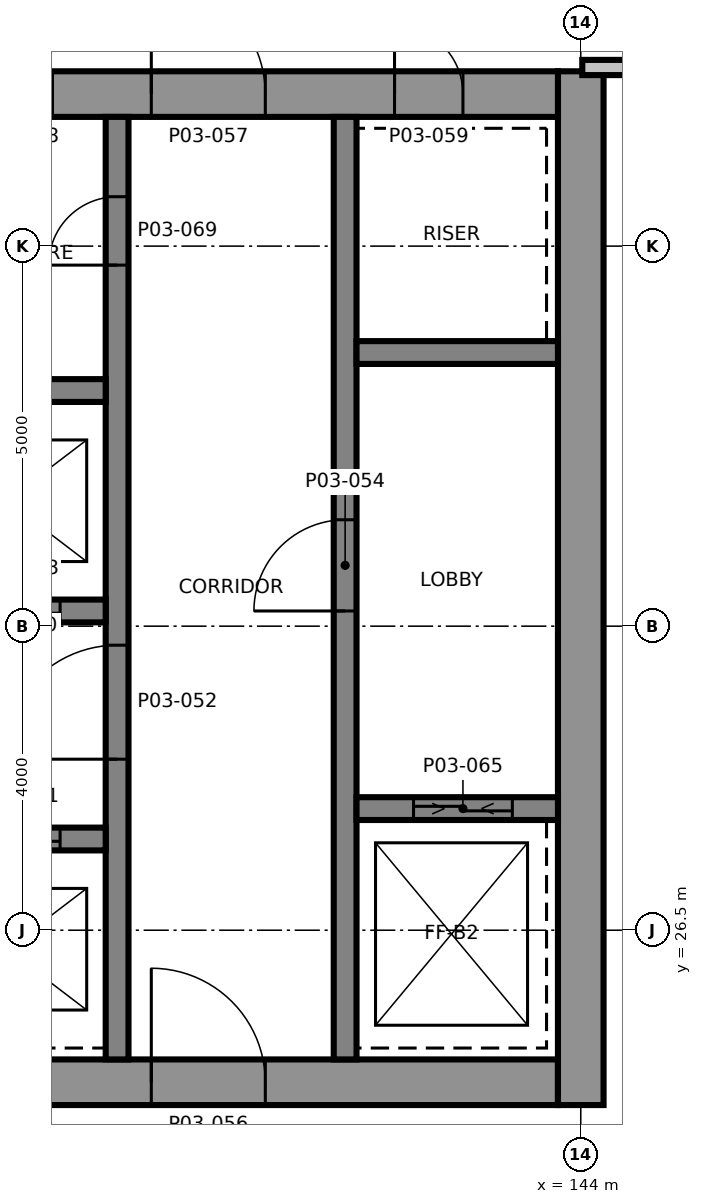
"""IFC4 building model, lengths in metres.
Left out: names, types, materials, properties, quantities, classifications, styles, units other than length and angle.
Written with IfcOpenShell. Run it as: python <this file> out.ifc"""

import sys

from ifc_helpers import new_model, si_unit, direction, frame, frame_2d, origin, place, context, subcontext, project, spatial, rectangle, extrude, element, fill, save


model = new_model("IFC4")
c1 = context("Model", 3, precision=1e-05, world=origin(), true_north=direction((0.0, 1.0)))
c2 = subcontext(c1, "Body", "Model", "MODEL_VIEW")
j1 = project(units=[si_unit("LENGTHUNIT", "METRE"), si_unit("PLANEANGLEUNIT", "RADIAN")], contexts=[c1])
p1 = place(None, origin())
s1 = spatial("IfcSite", under=j1, at=p1, CompositionType="ELEMENT")
p2 = place(p1, origin())
s2 = spatial("IfcBuilding", under=s1, at=p2, CompositionType="ELEMENT")
p3 = place(p2, frame((0.0, 0.0, 18.5)))
s3 = spatial("IfcBuildingStorey", under=s2, at=p3, CompositionType="ELEMENT", Elevation=18.5)
p4 = place(p3, frame((128.7, 24.5, 0.0), z_axis=(0.0, 0.0, 1.0), x_axis=(1.0, 0.0, 0.0)))
e1 = element("IfcWall", 1, at=p4, inside=s3, PredefinedType="SHEAR", context=c2, shape_type="SweptSolid", body=[
    extrude(rectangle(XDim=15.0, YDim=0.6, at=frame_2d((7.5, 0.0))), origin(), (0.0, 0.0, 1.0), 5.0),
])
p5 = place(p4, frame((9.65, 0.0, 0.0)))
e2 = element("IfcOpeningElement", 2, at=p5, cuts=e1, PredefinedType="OPENING", context=c2, shape_type="SweptSolid", body=[
    extrude(rectangle(XDim=1.5, YDim=2.1, at=frame_2d((0.75, 1.05))), frame((0.0, 0.31, 0.0), z_axis=(0.0, -1.0, 0.0), x_axis=(1.0, 0.0, 0.0)), (0.0, 0.0, 1.0), 0.62),
])
p6 = place(p4, frame((1.25, 0.0, 0.0)))
e3 = element("IfcOpeningElement", 3, at=p6, cuts=e1, PredefinedType="OPENING", context=c2, shape_type="SweptSolid", body=[
    extrude(rectangle(XDim=0.9, YDim=2.1, at=frame_2d((0.45, 1.05))), frame((0.0, 0.31, 0.0), z_axis=(0.0, -1.0, 0.0), x_axis=(1.0, 0.0, 0.0)), (0.0, 0.0, 1.0), 0.62),
])
p7 = place(p3, frame((144.0, 24.2, 0.0), z_axis=(0.0, 0.0, 1.0), x_axis=(0.0, 1.0, 0.0)))
e4 = element("IfcWall", 4, at=p7, inside=s3, PredefinedType="SHEAR", context=c2, shape_type="SweptSolid", body=[
    extrude(rectangle(XDim=13.6, YDim=0.6, at=frame_2d((6.8, 0.0))), origin(), (0.0, 0.0, 1.0), 5.0),
])
p8 = place(p3, frame((128.7, 37.5, 0.0), z_axis=(0.0, 0.0, 1.0), x_axis=(1.0, 0.0, 0.0)))
e5 = element("IfcWall", 5, at=p8, inside=s3, PredefinedType="SHEAR", context=c2, shape_type="SweptSolid", body=[
    extrude(rectangle(XDim=15.0, YDim=0.6, at=frame_2d((7.5, 0.0))), origin(), (0.0, 0.0, 1.0), 5.0),
])
p9 = place(p8, frame((9.65, 0.0, 0.0)))
e6 = element("IfcOpeningElement", 6, at=p9, cuts=e5, PredefinedType="OPENING", context=c2, shape_type="SweptSolid", body=[
    extrude(rectangle(XDim=1.5, YDim=2.1, at=frame_2d((0.75, 1.05))), frame((0.0, 0.31, 0.0), z_axis=(0.0, -1.0, 0.0), x_axis=(1.0, 0.0, 0.0)), (0.0, 0.0, 1.0), 0.62),
])
p10 = place(p8, frame((12.85, 0.0, 0.0)))
e7 = element("IfcOpeningElement", 7, at=p10, cuts=e5, PredefinedType="OPENING", context=c2, shape_type="SweptSolid", body=[
    extrude(rectangle(XDim=0.9, YDim=2.1, at=frame_2d((0.45, 1.05))), frame((0.0, 0.31, 0.0), z_axis=(0.0, -1.0, 0.0), x_axis=(1.0, 0.0, 0.0)), (0.0, 0.0, 1.0), 0.62),
])
p11 = place(p8, frame((3.6, 0.0, 0.0)))
e8 = element("IfcOpeningElement", 8, at=p11, cuts=e5, PredefinedType="OPENING", context=c2, shape_type="SweptSolid", body=[
    extrude(rectangle(XDim=0.9, YDim=2.1, at=frame_2d((0.45, 1.05))), frame((0.0, 0.31, 0.0), z_axis=(0.0, -1.0, 0.0), x_axis=(1.0, 0.0, 0.0)), (0.0, 0.0, 1.0), 0.62),
])
p12 = place(p8, frame((5.5, 0.0, 0.0)))
e9 = element("IfcOpeningElement", 9, at=p12, cuts=e5, PredefinedType="OPENING", context=c2, shape_type="SweptSolid", body=[
    extrude(rectangle(XDim=0.9, YDim=2.1, at=frame_2d((0.45, 1.05))), frame((0.0, 0.31, 0.0), z_axis=(0.0, -1.0, 0.0), x_axis=(1.0, 0.0, 0.0)), (0.0, 0.0, 1.0), 0.62),
])
p13 = place(p8, frame((7.45, 0.0, 0.0)))
e10 = element("IfcOpeningElement", 10, at=p13, cuts=e5, PredefinedType="OPENING", context=c2, shape_type="SweptSolid", body=[
    extrude(rectangle(XDim=0.9, YDim=2.1, at=frame_2d((0.45, 1.05))), frame((0.0, 0.31, 0.0), z_axis=(0.0, -1.0, 0.0), x_axis=(1.0, 0.0, 0.0)), (0.0, 0.0, 1.0), 0.62),
])
p14 = place(p3, frame((137.9, 24.8, 0.0), z_axis=(0.0, 0.0, 1.0), x_axis=(0.0, 1.0, 0.0)))
e11 = element("IfcWall", 11, at=p14, inside=s3, PredefinedType="SHEAR", context=c2, shape_type="SweptSolid", body=[
    extrude(rectangle(XDim=12.4, YDim=0.3, at=frame_2d((6.2, 0.0))), origin(), (0.0, 0.0, 1.0), 5.0),
])
p15 = place(p14, frame((3.95, 0.0, 0.0)))
e12 = element("IfcOpeningElement", 12, at=p15, cuts=e11, PredefinedType="OPENING", context=c2, shape_type="SweptSolid", body=[
    extrude(rectangle(XDim=1.5, YDim=2.1, at=frame_2d((0.75, 1.05))), frame((0.0, 0.16, 0.0), z_axis=(0.0, -1.0, 0.0), x_axis=(1.0, 0.0, 0.0)), (0.0, 0.0, 1.0), 0.32),
])
p16 = place(p14, frame((10.45, 0.0, 0.0)))
e13 = element("IfcOpeningElement", 13, at=p16, cuts=e11, PredefinedType="OPENING", context=c2, shape_type="SweptSolid", body=[
    extrude(rectangle(XDim=0.9, YDim=2.1, at=frame_2d((0.45, 1.05))), frame((0.0, 0.16, 0.0), z_axis=(0.0, -1.0, 0.0), x_axis=(1.0, 0.0, 0.0)), (0.0, 0.0, 1.0), 0.32),
])
p17 = place(p3, frame((140.9, 24.8, 0.0), z_axis=(0.0, 0.0, 1.0), x_axis=(0.0, 1.0, 0.0)))
e14 = element("IfcWall", 14, at=p17, inside=s3, PredefinedType="SHEAR", context=c2, shape_type="SweptSolid", body=[
    extrude(rectangle(XDim=12.4, YDim=0.3, at=frame_2d((6.2, 0.0))), origin(), (0.0, 0.0, 1.0), 5.0),
])
p18 = place(p17, frame((5.9, 0.0, 0.0)))
e15 = element("IfcOpeningElement", 15, at=p18, cuts=e14, PredefinedType="OPENING", context=c2, shape_type="SweptSolid", body=[
    extrude(rectangle(XDim=1.2, YDim=2.1, at=frame_2d((0.6, 1.05))), frame((0.0, 0.16, 0.0), z_axis=(0.0, -1.0, 0.0), x_axis=(1.0, 0.0, 0.0)), (0.0, 0.0, 1.0), 0.32),
])
p19 = place(p3, frame((132.25, 27.7, 0.0), z_axis=(0.0, 0.0, 1.0), x_axis=(1.0, 0.0, 0.0)))
e16 = element("IfcWall", 16, at=p19, inside=s3, PredefinedType="SHEAR", context=c2, shape_type="SweptSolid", body=[
    extrude(rectangle(XDim=5.5, YDim=0.3, at=frame_2d((2.75, 0.0))), origin(), (0.0, 0.0, 1.0), 5.0),
])
p20 = place(p19, frame((0.9, 0.0, 0.0)))
e17 = element("IfcOpeningElement", 17, at=p20, cuts=e16, PredefinedType="OPENING", context=c2, shape_type="SweptSolid", body=[
    extrude(rectangle(XDim=1.1, YDim=2.4, at=frame_2d((0.55, 1.2))), frame((0.0, 0.16, 0.0), z_axis=(0.0, -1.0, 0.0), x_axis=(1.0, 0.0, 0.0)), (0.0, 0.0, 1.0), 0.32),
])
p21 = place(p19, frame((3.8, 0.0, 0.0)))
e18 = element("IfcOpeningElement", 18, at=p21, cuts=e16, PredefinedType="OPENING", context=c2, shape_type="SweptSolid", body=[
    extrude(rectangle(XDim=1.1, YDim=2.4, at=frame_2d((0.55, 1.2))), frame((0.0, 0.16, 0.0), z_axis=(0.0, -1.0, 0.0), x_axis=(1.0, 0.0, 0.0)), (0.0, 0.0, 1.0), 0.32),
])
p22 = place(p3, frame((132.25, 30.7, 0.0), z_axis=(0.0, 0.0, 1.0), x_axis=(1.0, 0.0, 0.0)))
e19 = element("IfcWall", 19, at=p22, inside=s3, PredefinedType="SHEAR", context=c2, shape_type="SweptSolid", body=[
    extrude(rectangle(XDim=5.5, YDim=0.3, at=frame_2d((2.75, 0.0))), origin(), (0.0, 0.0, 1.0), 5.0),
])
p23 = place(p22, frame((0.9, 0.0, 0.0)))
e20 = element("IfcOpeningElement", 20, at=p23, cuts=e19, PredefinedType="OPENING", context=c2, shape_type="SweptSolid", body=[
    extrude(rectangle(XDim=1.1, YDim=2.4, at=frame_2d((0.55, 1.2))), frame((0.0, 0.16, 0.0), z_axis=(0.0, -1.0, 0.0), x_axis=(1.0, 0.0, 0.0)), (0.0, 0.0, 1.0), 0.32),
])
p24 = place(p22, frame((3.8, 0.0, 0.0)))
e21 = element("IfcOpeningElement", 21, at=p24, cuts=e19, PredefinedType="OPENING", context=c2, shape_type="SweptSolid", body=[
    extrude(rectangle(XDim=1.1, YDim=2.4, at=frame_2d((0.55, 1.2))), frame((0.0, 0.16, 0.0), z_axis=(0.0, -1.0, 0.0), x_axis=(1.0, 0.0, 0.0)), (0.0, 0.0, 1.0), 0.32),
])
p25 = place(p3, frame((132.25, 33.6, 0.0), z_axis=(0.0, 0.0, 1.0), x_axis=(1.0, 0.0, 0.0)))
e22 = element("IfcWall", 22, at=p25, inside=s3, PredefinedType="SHEAR", context=c2, shape_type="SweptSolid", body=[
    extrude(rectangle(XDim=5.5, YDim=0.3, at=frame_2d((2.75, 0.0))), origin(), (0.0, 0.0, 1.0), 5.0),
])
p26 = place(p3, frame((141.05, 28.1, 0.0), z_axis=(0.0, 0.0, 1.0), x_axis=(1.0, 0.0, 0.0)))
e23 = element("IfcWall", 23, at=p26, inside=s3, PredefinedType="SHEAR", context=c2, shape_type="SweptSolid", body=[
    extrude(rectangle(XDim=2.65, YDim=0.3, at=frame_2d((1.325, 0.0))), origin(), (0.0, 0.0, 1.0), 5.0),
])
p27 = place(p26, frame((0.75, 0.0, 0.0)))
e24 = element("IfcOpeningElement", 24, at=p27, cuts=e23, PredefinedType="OPENING", context=c2, shape_type="SweptSolid", body=[
    extrude(rectangle(XDim=1.3, YDim=2.4, at=frame_2d((0.65, 1.2))), frame((0.0, 0.16, 0.0), z_axis=(0.0, -1.0, 0.0), x_axis=(1.0, 0.0, 0.0)), (0.0, 0.0, 1.0), 0.32),
])
p28 = place(p3, frame((141.05, 34.1, 0.0), z_axis=(0.0, 0.0, 1.0), x_axis=(1.0, 0.0, 0.0)))
e25 = element("IfcWall", 25, at=p28, inside=s3, PredefinedType="SHEAR", context=c2, shape_type="SweptSolid", body=[
    extrude(rectangle(XDim=2.65, YDim=0.3, at=frame_2d((1.325, 0.0))), origin(), (0.0, 0.0, 1.0), 5.0),
])
p29 = place(p3, frame((144.02, 37.85, 0.0), z_axis=(0.0, 0.0, 1.0), x_axis=(1.0, 0.0, 0.0)))
e26 = element("IfcWall", 26, at=p29, inside=s3, PredefinedType="PARTITIONING", context=c2, shape_type="SweptSolid", body=[
    extrude(rectangle(XDim=3.23, YDim=0.2, at=frame_2d((1.615, 0.0))), origin(), (0.0, 0.0, 1.0), 4.7),
])
p30 = place(p29, frame((1.03, 0.0, 0.0)))
e27 = element("IfcOpeningElement", 27, at=p30, cuts=e26, PredefinedType="OPENING", context=c2, shape_type="SweptSolid", body=[
    extrude(rectangle(XDim=1.5, YDim=2.1, at=frame_2d((0.75, 1.05))), frame((0.0, 0.11, 0.0), z_axis=(0.0, -1.0, 0.0), x_axis=(1.0, 0.0, 0.0)), (0.0, 0.0, 1.0), 0.22),
])
p31 = place(p15, origin())
e28 = element("IfcDoor", 28, at=p31, inside=s3, OperationType="SINGLE_SWING_RIGHT", PredefinedType="DOOR", context=c2, shape_type="SweptSolid", body=[
    extrude(rectangle(XDim=1.5, YDim=2.1, at=frame_2d((0.75, 1.05))), frame((0.0, 0.025, 0.0), z_axis=(0.0, -1.0, 0.0), x_axis=(1.0, 0.0, 0.0)), (0.0, 0.0, 1.0), 0.05),
])
fill(e12, e28)
p32 = place(p18, origin())
e29 = element("IfcDoor", 29, at=p32, inside=s3, OperationType="SINGLE_SWING_RIGHT", PredefinedType="DOOR", context=c2, shape_type="SweptSolid", body=[
    extrude(rectangle(XDim=1.2, YDim=2.1, at=frame_2d((0.6, 1.05))), frame((0.0, 0.025, 0.0), z_axis=(0.0, -1.0, 0.0), x_axis=(1.0, 0.0, 0.0)), (0.0, 0.0, 1.0), 0.05),
])
fill(e15, e29)
p33 = place(p5, origin())
e30 = element("IfcDoor", 30, at=p33, inside=s3, OperationType="SINGLE_SWING_LEFT", PredefinedType="DOOR", context=c2, shape_type="SweptSolid", body=[
    extrude(rectangle(XDim=1.5, YDim=2.1, at=frame_2d((0.75, 1.05))), frame((0.0, 0.025, 0.0), z_axis=(0.0, -1.0, 0.0), x_axis=(1.0, 0.0, 0.0)), (0.0, 0.0, 1.0), 0.05),
])
fill(e2, e30)
p34 = place(p9, origin())
e31 = element("IfcDoor", 31, at=p34, inside=s3, OperationType="SINGLE_SWING_RIGHT", PredefinedType="DOOR", context=c2, shape_type="SweptSolid", body=[
    extrude(rectangle(XDim=1.5, YDim=2.1, at=frame_2d((0.75, 1.05))), frame((0.0, 0.025, 0.0), z_axis=(0.0, -1.0, 0.0), x_axis=(1.0, 0.0, 0.0)), (0.0, 0.0, 1.0), 0.05),
])
fill(e6, e31)
p35 = place(p10, origin())
e32 = element("IfcDoor", 32, at=p35, inside=s3, OperationType="SINGLE_SWING_RIGHT", PredefinedType="DOOR", context=c2, shape_type="SweptSolid", body=[
    extrude(rectangle(XDim=0.9, YDim=2.1, at=frame_2d((0.45, 1.05))), frame((0.0, 0.025, 0.0), z_axis=(0.0, -1.0, 0.0), x_axis=(1.0, 0.0, 0.0)), (0.0, 0.0, 1.0), 0.05),
])
fill(e7, e32)
p36 = place(p21, origin())
e33 = element("IfcDoor", 33, at=p36, inside=s3, OperationType="SLIDING_TO_LEFT", PredefinedType="DOOR", context=c2, shape_type="SweptSolid", body=[
    extrude(rectangle(XDim=1.1, YDim=2.4, at=frame_2d((0.55, 1.2))), frame((0.0, 0.025, 0.0), z_axis=(0.0, -1.0, 0.0), x_axis=(1.0, 0.0, 0.0)), (0.0, 0.0, 1.0), 0.05),
])
fill(e18, e33)
p37 = place(p24, origin())
e34 = element("IfcDoor", 34, at=p37, inside=s3, OperationType="SLIDING_TO_LEFT", PredefinedType="DOOR", context=c2, shape_type="SweptSolid", body=[
    extrude(rectangle(XDim=1.1, YDim=2.4, at=frame_2d((0.55, 1.2))), frame((0.0, 0.025, 0.0), z_axis=(0.0, -1.0, 0.0), x_axis=(1.0, 0.0, 0.0)), (0.0, 0.0, 1.0), 0.05),
])
fill(e21, e34)
p38 = place(p27, origin())
e35 = element("IfcDoor", 35, at=p38, inside=s3, OperationType="SLIDING_TO_LEFT", PredefinedType="DOOR", context=c2, shape_type="SweptSolid", body=[
    extrude(rectangle(XDim=1.3, YDim=2.4, at=frame_2d((0.65, 1.2))), frame((0.0, 0.025, 0.0), z_axis=(0.0, -1.0, 0.0), x_axis=(1.0, 0.0, 0.0)), (0.0, 0.0, 1.0), 0.05),
])
fill(e24, e35)
p39 = place(p16, origin())
e36 = element("IfcDoor", 36, at=p39, inside=s3, OperationType="SINGLE_SWING_RIGHT", PredefinedType="DOOR", context=c2, shape_type="SweptSolid", body=[
    extrude(rectangle(XDim=0.9, YDim=2.1, at=frame_2d((0.45, 1.05))), frame((0.0, 0.025, 0.0), z_axis=(0.0, -1.0, 0.0), x_axis=(1.0, 0.0, 0.0)), (0.0, 0.0, 1.0), 0.05),
])
fill(e13, e36)
save(model, sys.argv[1])
